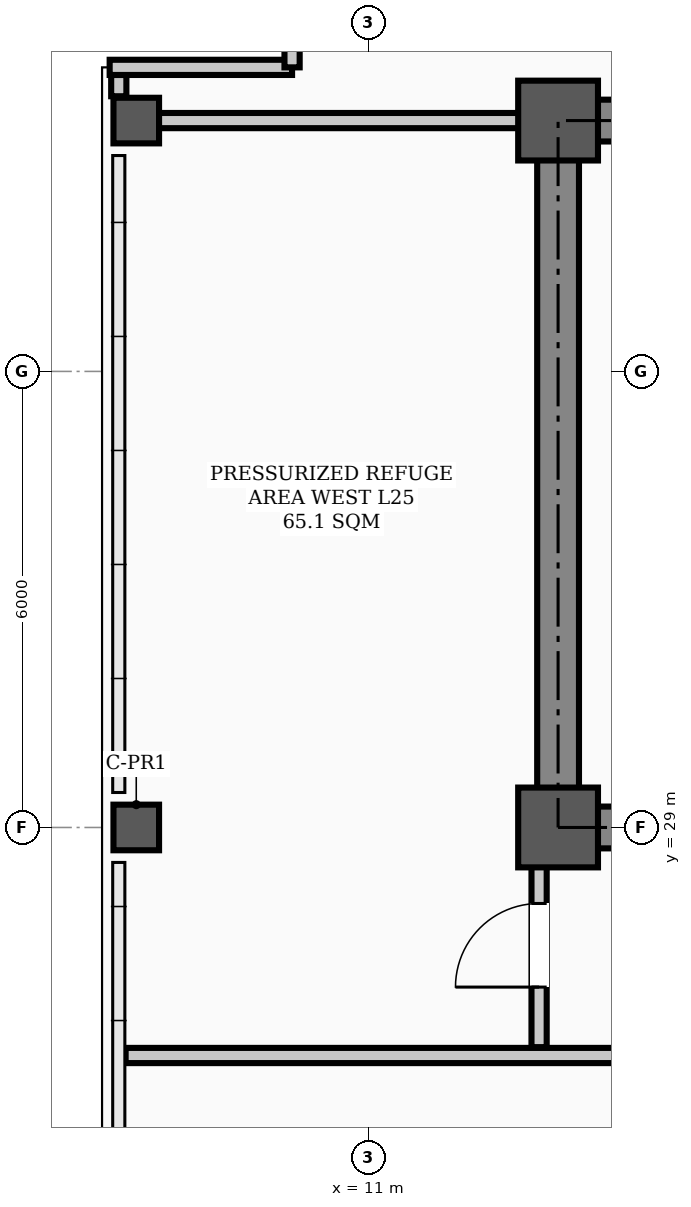
"""IFC4 building model, lengths in metres.
Left out: names, types, materials, properties, quantities, classifications, styles, units other than length and angle.
Written with IfcOpenShell. Run it as: python <this file> out.ifc"""

import sys

from ifc_helpers import new_model, si_unit, direction, frame, frame_2d, origin, origin_2d, place, context, subcontext, project, spatial, rectangle, hollow_rectangle, extrude, element, fill, save


model = new_model("IFC4")
c1 = context("Model", 3, precision=1e-05, world=origin(), true_north=direction((0.0, 1.0)))
c2 = subcontext(c1, "Body", "Model", "MODEL_VIEW")
j1 = project(units=[si_unit("LENGTHUNIT", "METRE"), si_unit("PLANEANGLEUNIT", "RADIAN")], contexts=[c1])
p1 = place(None, origin())
s1 = spatial("IfcSite", under=j1, at=p1, CompositionType="ELEMENT")
p2 = place(p1, origin())
s2 = spatial("IfcBuilding", under=s1, at=p2, CompositionType="ELEMENT")
p3 = place(p2, frame((0.0, 0.0, 100.6)))
s3 = spatial("IfcBuildingStorey", under=s2, at=p3, CompositionType="ELEMENT", Elevation=100.6)
for number, where, z_axis, x_axis in (
    (1, (13.5, 29.0, 0.0), (0.0, 0.0, 1.0), (1.0, 0.0, 0.0)),
    (2, (13.5, 38.3, 0.0), (0.0, 0.0, 1.0), (1.0, 0.0, 0.0)),
):
    element("IfcColumn", number, at=place(p3, frame(where, z_axis=z_axis, x_axis=x_axis)), inside=s3, PredefinedType="COLUMN", context=c2, shape_type="SweptSolid", body=[
        extrude(hollow_rectangle(XDim=1.05, YDim=1.05, WallThickness=0.038, InnerFilletRadius=0.019, OuterFilletRadius=0.057, at=origin_2d()), origin(), (0.0, 0.0, 1.0), 5.4),
    ])
for number, where, z_axis, x_axis in (
    (3, (7.95, 29.0, 0.0), (0.0, 0.0, 1.0), (1.0, 0.0, 0.0)),
    (4, (7.95, 38.3, 0.0), (0.0, 0.0, 1.0), (1.0, 0.0, 0.0)),
):
    element("IfcColumn", number, at=place(p3, frame(where, z_axis=z_axis, x_axis=x_axis)), inside=s3, PredefinedType="COLUMN", context=c2, shape_type="SweptSolid", body=[
        extrude(hollow_rectangle(XDim=0.6, YDim=0.6, WallThickness=0.026, InnerFilletRadius=0.013, OuterFilletRadius=0.039, at=origin_2d()), origin(), (0.0, 0.0, 1.0), 5.4),
    ])
p4 = place(p3, frame((7.72, 38.62, 0.0), z_axis=(0.0, 0.0, 1.0), x_axis=(0.0, 1.0, 0.0)))
e5 = element("IfcWall", 5, at=p4, inside=s3, PredefinedType="PARAPET", context=c2, shape_type="SweptSolid", body=[
    extrude(rectangle(XDim=0.28, YDim=0.2, at=frame_2d((0.14, 0.0))), origin(), (0.0, 0.0, 1.0), 1.2),
])
for number, where, z_axis, x_axis in (
    (6, (7.6, 39.0, 0.0), (0.0, 0.0, 1.0), (1.0, 0.0, 0.0)),
    (7, (10.0, 39.0, 0.0), (0.0, 0.0, 1.0), (0.0, 1.0, 0.0)),
):
    element("IfcWall", number, at=place(p3, frame(where, z_axis=z_axis, x_axis=x_axis)), inside=s3, PredefinedType="PARAPET", context=c2, shape_type="SweptSolid", body=[
        extrude(rectangle(XDim=2.4, YDim=0.2, at=frame_2d((1.2, 0.0))), origin(), (0.0, 0.0, 1.0), 1.2),
    ])
p5 = place(p3, frame((13.5, 29.0, 0.0), z_axis=(0.0, 0.0, 1.0), x_axis=(1.0, 0.0, 0.0)))
e8 = element("IfcWall", 8, at=p5, inside=s3, PredefinedType="SHEAR", context=c2, shape_type="SweptSolid", body=[
    extrude(rectangle(XDim=30.5, YDim=0.55, at=frame_2d((15.25, 0.0))), origin(), (0.0, 0.0, 1.0), 5.22),
])
p6 = place(p5, frame((1.75, 0.0, 0.0)))
e9 = element("IfcOpeningElement", 9, at=p6, cuts=e8, PredefinedType="OPENING", context=c2, shape_type="SweptSolid", body=[
    extrude(rectangle(XDim=1.1, YDim=2.08, at=frame_2d((0.55, 1.04))), frame((0.0, 0.285, 0.0), z_axis=(0.0, -1.0, 0.0), x_axis=(1.0, 0.0, 0.0)), (0.0, 0.0, 1.0), 0.57),
])
p7 = place(p5, frame((26.7, 0.0, 0.0)))
e10 = element("IfcOpeningElement", 10, at=p7, cuts=e8, PredefinedType="OPENING", context=c2, shape_type="SweptSolid", body=[
    extrude(rectangle(XDim=1.1, YDim=2.08, at=frame_2d((0.55, 1.04))), frame((0.0, 0.285, 0.0), z_axis=(0.0, -1.0, 0.0), x_axis=(1.0, 0.0, 0.0)), (0.0, 0.0, 1.0), 0.57),
])
p8 = place(p5, frame((6.8, 0.0, 0.0)))
e11 = element("IfcOpeningElement", 11, at=p8, cuts=e8, PredefinedType="OPENING", context=c2, shape_type="SweptSolid", body=[
    extrude(rectangle(XDim=1.1, YDim=2.08, at=frame_2d((0.55, 1.04))), frame((0.0, 0.285, 0.0), z_axis=(0.0, -1.0, 0.0), x_axis=(1.0, 0.0, 0.0)), (0.0, 0.0, 1.0), 0.57),
])
p9 = place(p5, frame((13.2, 0.0, 0.0)))
e12 = element("IfcOpeningElement", 12, at=p9, cuts=e8, PredefinedType="OPENING", context=c2, shape_type="SweptSolid", body=[
    extrude(rectangle(XDim=1.6, YDim=2.08, at=frame_2d((0.8, 1.04))), frame((0.0, 0.285, 0.0), z_axis=(0.0, -1.0, 0.0), x_axis=(1.0, 0.0, 0.0)), (0.0, 0.0, 1.0), 0.57),
])
p10 = place(p5, frame((19.5, 0.0, 0.0)))
e13 = element("IfcOpeningElement", 13, at=p10, cuts=e8, PredefinedType="OPENING", context=c2, shape_type="SweptSolid", body=[
    extrude(rectangle(XDim=0.9, YDim=2.08, at=frame_2d((0.45, 1.04))), frame((0.0, 0.285, 0.0), z_axis=(0.0, -1.0, 0.0), x_axis=(1.0, 0.0, 0.0)), (0.0, 0.0, 1.0), 0.57),
])
p11 = place(p5, frame((21.55, 0.0, 0.0)))
e14 = element("IfcOpeningElement", 14, at=p11, cuts=e8, PredefinedType="OPENING", context=c2, shape_type="SweptSolid", body=[
    extrude(rectangle(XDim=0.9, YDim=2.08, at=frame_2d((0.45, 1.04))), frame((0.0, 0.285, 0.0), z_axis=(0.0, -1.0, 0.0), x_axis=(1.0, 0.0, 0.0)), (0.0, 0.0, 1.0), 0.57),
])
p12 = place(p3, frame((13.5, 38.3, 0.0), z_axis=(0.0, 0.0, 1.0), x_axis=(1.0, 0.0, 0.0)))
e15 = element("IfcWall", 15, at=p12, inside=s3, PredefinedType="SHEAR", context=c2, shape_type="SweptSolid", body=[
    extrude(rectangle(XDim=30.5, YDim=0.55, at=frame_2d((15.25, 0.0))), origin(), (0.0, 0.0, 1.0), 5.22),
])
p13 = place(p3, frame((13.5, 29.35, 0.0), z_axis=(0.0, 0.0, 1.0), x_axis=(0.0, 1.0, 0.0)))
e16 = element("IfcWall", 16, at=p13, inside=s3, PredefinedType="SHEAR", context=c2, shape_type="SweptSolid", body=[
    extrude(rectangle(XDim=8.6, YDim=0.55, at=frame_2d((4.3, 0.0))), origin(), (0.0, 0.0, 1.0), 5.22),
])
p14 = place(p3, frame((7.81, 26.0, 0.0), z_axis=(0.0, 0.0, 1.0), x_axis=(1.0, 0.0, 0.0)))
e17 = element("IfcWall", 17, at=p14, inside=s3, PredefinedType="STANDARD", context=c2, shape_type="SweptSolid", body=[
    extrude(rectangle(XDim=49.38, YDim=0.2, at=frame_2d((24.69, 0.0))), origin(), (0.0, 0.0, 1.0), 4.6),
])
p15 = place(p14, frame((10.84, 0.0, 0.0)))
e18 = element("IfcOpeningElement", 18, at=p15, cuts=e17, PredefinedType="OPENING", context=c2, shape_type="SweptSolid", body=[
    extrude(rectangle(XDim=1.1, YDim=2.08, at=frame_2d((0.55, 1.04))), frame((0.0, 0.11, 0.0), z_axis=(0.0, -1.0, 0.0), x_axis=(1.0, 0.0, 0.0)), (0.0, 0.0, 1.0), 0.22),
])
p16 = place(p14, frame((18.89, 0.0, 0.0)))
e19 = element("IfcOpeningElement", 19, at=p16, cuts=e17, PredefinedType="OPENING", context=c2, shape_type="SweptSolid", body=[
    extrude(rectangle(XDim=1.6, YDim=2.08, at=frame_2d((0.8, 1.04))), frame((0.0, 0.11, 0.0), z_axis=(0.0, -1.0, 0.0), x_axis=(1.0, 0.0, 0.0)), (0.0, 0.0, 1.0), 0.22),
])
p17 = place(p14, frame((25.89, 0.0, 0.0)))
e20 = element("IfcOpeningElement", 20, at=p17, cuts=e17, PredefinedType="OPENING", context=c2, shape_type="SweptSolid", body=[
    extrude(rectangle(XDim=1.1, YDim=2.08, at=frame_2d((0.55, 1.04))), frame((0.0, 0.11, 0.0), z_axis=(0.0, -1.0, 0.0), x_axis=(1.0, 0.0, 0.0)), (0.0, 0.0, 1.0), 0.22),
])
p18 = place(p14, frame((32.39, 0.0, 0.0)))
e21 = element("IfcOpeningElement", 21, at=p18, cuts=e17, PredefinedType="OPENING", context=c2, shape_type="SweptSolid", body=[
    extrude(rectangle(XDim=1.1, YDim=2.08, at=frame_2d((0.55, 1.04))), frame((0.0, 0.11, 0.0), z_axis=(0.0, -1.0, 0.0), x_axis=(1.0, 0.0, 0.0)), (0.0, 0.0, 1.0), 0.22),
])
p19 = place(p3, frame((7.81, 38.3, 0.0), z_axis=(0.0, 0.0, 1.0), x_axis=(1.0, 0.0, 0.0)))
e22 = element("IfcWall", 22, at=p19, inside=s3, PredefinedType="STANDARD", context=c2, shape_type="SweptSolid", body=[
    extrude(rectangle(XDim=5.69, YDim=0.2, at=frame_2d((2.845, 0.0))), origin(), (0.0, 0.0, 1.0), 4.5),
])
p20 = place(p3, frame((13.25, 26.11, 0.0), z_axis=(0.0, 0.0, 1.0), x_axis=(0.0, 1.0, 0.0)))
e23 = element("IfcWall", 23, at=p20, inside=s3, PredefinedType="STANDARD", context=c2, shape_type="SweptSolid", body=[
    extrude(rectangle(XDim=3.24, YDim=0.2, at=frame_2d((1.62, 0.0))), origin(), (0.0, 0.0, 1.0), 4.5),
])
p21 = place(p20, frame((0.79, 0.0, 0.0)))
e24 = element("IfcOpeningElement", 24, at=p21, cuts=e23, PredefinedType="OPENING", context=c2, shape_type="SweptSolid", body=[
    extrude(rectangle(XDim=1.1, YDim=2.08, at=frame_2d((0.55, 1.04))), frame((0.0, 0.11, 0.0), z_axis=(0.0, -1.0, 0.0), x_axis=(1.0, 0.0, 0.0)), (0.0, 0.0, 1.0), 0.22),
])
p22 = place(p21, origin())
e25 = element("IfcDoor", 25, at=p22, inside=s3, OperationType="SINGLE_SWING_LEFT", PredefinedType="DOOR", context=c2, shape_type="SweptSolid", body=[
    extrude(rectangle(XDim=1.1, YDim=2.08, at=frame_2d((0.55, 1.04))), frame((0.0, 0.025, 0.0), z_axis=(0.0, -1.0, 0.0), x_axis=(1.0, 0.0, 0.0)), (0.0, 0.0, 1.0), 0.05),
])
fill(e24, e25)
save(model, sys.argv[1])
